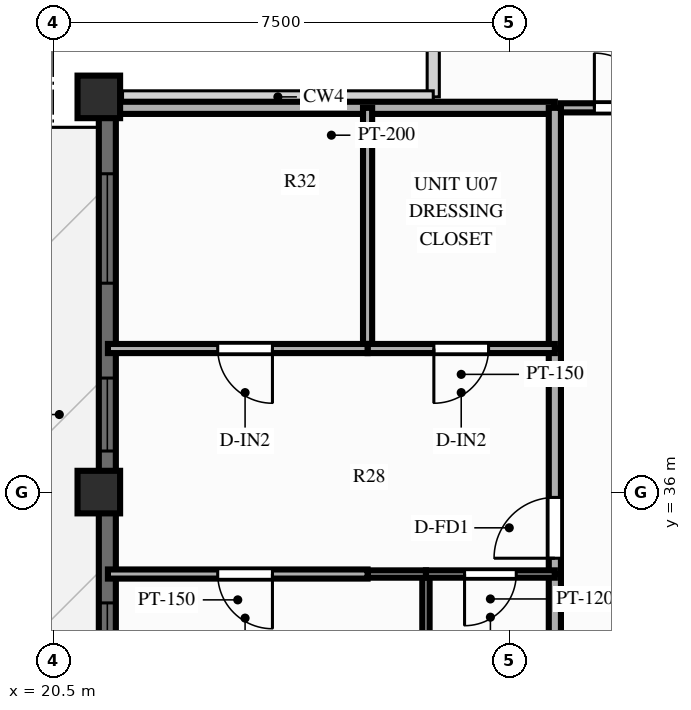
"""IFC4 building model, lengths in metres.
Left out: names, types, materials, properties, quantities, classifications, styles, units other than length and angle.
Written with IfcOpenShell. Run it as: python <this file> out.ifc"""

import sys

from ifc_helpers import new_model, si_unit, direction, frame, frame_2d, origin, origin_2d, place, context, subcontext, project, spatial, rectangle, extrude, source, transform, mapped, element, fill, save


model = new_model("IFC4")
c1 = context("Model", 3, precision=1e-05, world=origin(), true_north=direction((0.0, 1.0)))
c2 = subcontext(c1, "Body", "Model", "MODEL_VIEW")
j1 = project(units=[si_unit("LENGTHUNIT", "METRE"), si_unit("PLANEANGLEUNIT", "RADIAN")], contexts=[c1])
p1 = place(None, origin())
s1 = spatial("IfcSite", under=j1, at=p1, CompositionType="ELEMENT")
p2 = place(p1, origin())
s2 = spatial("IfcBuilding", under=s1, at=p2, CompositionType="ELEMENT")
p3 = place(p2, frame((0.0, 0.0, 226.2)))
s3 = spatial("IfcBuildingStorey", under=s2, at=p3, CompositionType="ELEMENT", Elevation=226.2)
m1 = source(origin(), c2, "Body", "SweptSolid", [
    extrude(rectangle(XDim=0.7, YDim=0.7, at=origin_2d()), origin(), (0.0, 0.0, 1.0), 3.9),
])
for number, where, z_axis, x_axis in (
    (1, (21.25, 42.5, 0.0), (0.0, 0.0, 1.0), (1.0, 0.0, 0.0)),
    (2, (21.25, 36.0, 0.0), (0.0, 0.0, 1.0), (1.0, 0.0, 0.0)),
):
    element("IfcColumn", number, at=place(p3, frame(where, z_axis=z_axis, x_axis=x_axis)), inside=s3, PredefinedType="COLUMN", context=c2, shape_type="MappedRepresentation", body=[
        mapped(m1, transform((0.0, 0.0, 0.0), scale=1.0)),
    ])
p4 = place(p3, frame((21.39, 11.5, 0.0), z_axis=(0.0, 0.0, 1.0), x_axis=(0.0, 1.0, 0.0)))
e3 = element("IfcWall", 3, at=p4, inside=s3, PredefinedType="SOLIDWALL", context=c2, shape_type="SweptSolid", body=[
    extrude(rectangle(XDim=31.0, YDim=0.28, at=frame_2d((15.5, 0.0))), origin(), (0.0, 0.0, 1.0), 2.79),
])
p5 = place(p4, frame((0.66, 0.0, 0.85)))
e4 = element("IfcOpeningElement", 4, at=p5, cuts=e3, PredefinedType="OPENING", context=c2, shape_type="SweptSolid", body=[
    extrude(rectangle(XDim=1.8, YDim=1.65, at=frame_2d((0.9, 0.825))), frame((0.0, 0.152, 0.0), z_axis=(0.0, -1.0, 0.0), x_axis=(1.0, 0.0, 0.0)), (0.0, 0.0, 1.0), 0.304),
])
p6 = place(p4, frame((3.72, 0.0, 0.85)))
e5 = element("IfcOpeningElement", 5, at=p6, cuts=e3, PredefinedType="OPENING", context=c2, shape_type="SweptSolid", body=[
    extrude(rectangle(XDim=1.8, YDim=1.65, at=frame_2d((0.9, 0.825))), frame((0.0, 0.152, 0.0), z_axis=(0.0, -1.0, 0.0), x_axis=(1.0, 0.0, 0.0)), (0.0, 0.0, 1.0), 0.304),
])
p7 = place(p4, frame((7.635, 0.0, 0.85)))
e6 = element("IfcOpeningElement", 6, at=p7, cuts=e3, PredefinedType="OPENING", context=c2, shape_type="SweptSolid", body=[
    extrude(rectangle(XDim=1.8, YDim=1.65, at=frame_2d((0.9, 0.825))), frame((0.0, 0.152, 0.0), z_axis=(0.0, -1.0, 0.0), x_axis=(1.0, 0.0, 0.0)), (0.0, 0.0, 1.0), 0.304),
])
p8 = place(p4, frame((10.766, 0.0, 0.85)))
e7 = element("IfcOpeningElement", 7, at=p8, cuts=e3, PredefinedType="OPENING", context=c2, shape_type="SweptSolid", body=[
    extrude(rectangle(XDim=1.8, YDim=1.65, at=frame_2d((0.9, 0.825))), frame((0.0, 0.152, 0.0), z_axis=(0.0, -1.0, 0.0), x_axis=(1.0, 0.0, 0.0)), (0.0, 0.0, 1.0), 0.304),
])
p9 = place(p4, frame((14.0, 0.0, 0.0)))
e8 = element("IfcOpeningElement", 8, at=p9, cuts=e3, PredefinedType="OPENING", context=c2, shape_type="SweptSolid", body=[
    extrude(rectangle(XDim=1.6, YDim=2.15, at=frame_2d((0.8, 1.075))), frame((0.0, 0.152, 0.0), z_axis=(0.0, -1.0, 0.0), x_axis=(1.0, 0.0, 0.0)), (0.0, 0.0, 1.0), 0.304),
])
p10 = place(p4, frame((17.581, 0.0, 0.85)))
e9 = element("IfcOpeningElement", 9, at=p10, cuts=e3, PredefinedType="OPENING", context=c2, shape_type="SweptSolid", body=[
    extrude(rectangle(XDim=1.8, YDim=1.65, at=frame_2d((0.9, 0.825))), frame((0.0, 0.152, 0.0), z_axis=(0.0, -1.0, 0.0), x_axis=(1.0, 0.0, 0.0)), (0.0, 0.0, 1.0), 0.304),
])
p11 = place(p4, frame((20.877, 0.0, 0.85)))
e10 = element("IfcOpeningElement", 10, at=p11, cuts=e3, PredefinedType="OPENING", context=c2, shape_type="SweptSolid", body=[
    extrude(rectangle(XDim=1.8, YDim=1.65, at=frame_2d((0.9, 0.825))), frame((0.0, 0.152, 0.0), z_axis=(0.0, -1.0, 0.0), x_axis=(1.0, 0.0, 0.0)), (0.0, 0.0, 1.0), 0.304),
])
p12 = place(p4, frame((25.176, 0.0, 0.85)))
e11 = element("IfcOpeningElement", 11, at=p12, cuts=e3, PredefinedType="OPENING", context=c2, shape_type="SweptSolid", body=[
    extrude(rectangle(XDim=1.2, YDim=1.5, at=frame_2d((0.6, 0.75))), frame((0.0, 0.152, 0.0), z_axis=(0.0, -1.0, 0.0), x_axis=(1.0, 0.0, 0.0)), (0.0, 0.0, 1.0), 0.304),
])
p13 = place(p4, frame((27.936, 0.0, 0.85)))
e12 = element("IfcOpeningElement", 12, at=p13, cuts=e3, PredefinedType="OPENING", context=c2, shape_type="SweptSolid", body=[
    extrude(rectangle(XDim=1.8, YDim=1.65, at=frame_2d((0.9, 0.825))), frame((0.0, 0.152, 0.0), z_axis=(0.0, -1.0, 0.0), x_axis=(1.0, 0.0, 0.0)), (0.0, 0.0, 1.0), 0.304),
])
p14 = place(p3, frame((28.85, 42.32, 0.0), z_axis=(0.0, 0.0, 1.0), x_axis=(1.0, 0.0, 0.0)))
e13 = element("IfcWall", 13, at=p14, inside=s3, PredefinedType="PARTITIONING", context=c2, shape_type="SweptSolid", body=[
    extrude(rectangle(XDim=2.33, YDim=0.15, at=frame_2d((1.165, 0.0))), origin(), (0.0, 0.0, 1.0), 3.69),
])
p15 = place(p14, frame((0.55, 0.0, 0.0)))
e14 = element("IfcOpeningElement", 14, at=p15, cuts=e13, PredefinedType="OPENING", context=c2, shape_type="SweptSolid", body=[
    extrude(rectangle(XDim=0.9, YDim=2.1, at=frame_2d((0.45, 1.05))), frame((0.0, 0.087, 0.0), z_axis=(0.0, -1.0, 0.0), x_axis=(1.0, 0.0, 0.0)), (0.0, 0.0, 1.0), 0.174),
])
p16 = place(p3, frame((28.75, 42.32, 0.0), z_axis=(0.0, 0.0, 1.0), x_axis=(-1.0, 0.0, 0.0)))
e15 = element("IfcWall", 15, at=p16, inside=s3, PredefinedType="PARTITIONING", context=c2, shape_type="SweptSolid", body=[
    extrude(rectangle(XDim=7.35, YDim=0.2, at=frame_2d((3.675, 0.0))), origin(), (0.0, 0.0, 1.0), 3.69),
])
p17 = place(p3, frame((28.75, 31.902, 0.0), z_axis=(0.0, 0.0, 1.0), x_axis=(0.0, 1.0, 0.0)))
e16 = element("IfcWall", 16, at=p17, inside=s3, PredefinedType="PARTITIONING", context=c2, shape_type="SweptSolid", body=[
    extrude(rectangle(XDim=2.75, YDim=0.2, at=frame_2d((1.375, 0.0))), origin(), (0.0, 0.0, 1.0), 3.69),
])
p18 = place(p3, frame((28.75, 34.652, 0.0), z_axis=(0.0, 0.0, 1.0), x_axis=(0.0, 1.0, 0.0)))
e17 = element("IfcWall", 17, at=p18, inside=s3, PredefinedType="PARTITIONING", context=c2, shape_type="SweptSolid", body=[
    extrude(rectangle(XDim=3.709, YDim=0.2, at=frame_2d((1.854, 0.0))), origin(), (0.0, 0.0, 1.0), 3.69),
])
p19 = place(p18, frame((0.26, 0.0, 0.0)))
e18 = element("IfcOpeningElement", 18, at=p19, cuts=e17, PredefinedType="OPENING", context=c2, shape_type="SweptSolid", body=[
    extrude(rectangle(XDim=1.0, YDim=2.15, at=frame_2d((0.5, 1.075))), frame((0.0, 0.112, 0.0), z_axis=(0.0, -1.0, 0.0), x_axis=(1.0, 0.0, 0.0)), (0.0, 0.0, 1.0), 0.224),
])
p20 = place(p3, frame((28.75, 38.361, 0.0), z_axis=(0.0, 0.0, 1.0), x_axis=(0.0, 1.0, 0.0)))
e19 = element("IfcWall", 19, at=p20, inside=s3, PredefinedType="PARTITIONING", context=c2, shape_type="SweptSolid", body=[
    extrude(rectangle(XDim=3.959, YDim=0.2, at=frame_2d((1.979, 0.0))), origin(), (0.0, 0.0, 1.0), 3.69),
])
p21 = place(p3, frame((26.63, 31.902, 0.0), z_axis=(0.0, 0.0, 1.0), x_axis=(0.0, 1.0, 0.0)))
e20 = element("IfcWall", 20, at=p21, inside=s3, PredefinedType="PARTITIONING", context=c2, shape_type="SweptSolid", body=[
    extrude(rectangle(XDim=2.75, YDim=0.12, at=frame_2d((1.375, 0.0))), origin(), (0.0, 0.0, 1.0), 3.39),
])
p22 = place(p3, frame((25.67, 38.361, 0.0), z_axis=(0.0, 0.0, 1.0), x_axis=(0.0, 1.0, 0.0)))
e21 = element("IfcWall", 21, at=p22, inside=s3, PredefinedType="PARTITIONING", context=c2, shape_type="SweptSolid", body=[
    extrude(rectangle(XDim=3.959, YDim=0.15, at=frame_2d((1.979, 0.0))), origin(), (0.0, 0.0, 1.0), 3.69),
])
p23 = place(p3, frame((28.75, 34.652, 0.0), z_axis=(0.0, 0.0, 1.0), x_axis=(-1.0, 0.0, 0.0)))
e22 = element("IfcWall", 22, at=p23, inside=s3, PredefinedType="PARTITIONING", context=c2, shape_type="SweptSolid", body=[
    extrude(rectangle(XDim=2.12, YDim=0.12, at=frame_2d((1.06, 0.0))), origin(), (0.0, 0.0, 1.0), 3.69),
])
p24 = place(p23, frame((0.635, 0.0, 0.0)))
e23 = element("IfcOpeningElement", 23, at=p24, cuts=e22, PredefinedType="OPENING", context=c2, shape_type="SweptSolid", body=[
    extrude(rectangle(XDim=0.85, YDim=2.05, at=frame_2d((0.425, 1.025))), frame((0.0, 0.072, 0.0), z_axis=(0.0, -1.0, 0.0), x_axis=(1.0, 0.0, 0.0)), (0.0, 0.0, 1.0), 0.144),
])
p25 = place(p3, frame((26.63, 34.652, 0.0), z_axis=(0.0, 0.0, 1.0), x_axis=(-1.0, 0.0, 0.0)))
e24 = element("IfcWall", 24, at=p25, inside=s3, PredefinedType="PARTITIONING", context=c2, shape_type="SweptSolid", body=[
    extrude(rectangle(XDim=0.96, YDim=0.12, at=frame_2d((0.48, 0.0))), origin(), (0.0, 0.0, 1.0), 3.69),
])
p26 = place(p3, frame((25.67, 34.652, 0.0), z_axis=(0.0, 0.0, 1.0), x_axis=(-1.0, 0.0, 0.0)))
e25 = element("IfcWall", 25, at=p26, inside=s3, PredefinedType="PARTITIONING", context=c2, shape_type="SweptSolid", body=[
    extrude(rectangle(XDim=4.27, YDim=0.15, at=frame_2d((2.135, 0.0))), origin(), (0.0, 0.0, 1.0), 3.69),
])
p27 = place(p26, frame((1.565, 0.0, 0.0)))
e26 = element("IfcOpeningElement", 26, at=p27, cuts=e25, PredefinedType="OPENING", context=c2, shape_type="SweptSolid", body=[
    extrude(rectangle(XDim=0.9, YDim=2.1, at=frame_2d((0.45, 1.05))), frame((0.0, 0.087, 0.0), z_axis=(0.0, -1.0, 0.0), x_axis=(1.0, 0.0, 0.0)), (0.0, 0.0, 1.0), 0.174),
])
p28 = place(p3, frame((28.75, 38.361, 0.0), z_axis=(0.0, 0.0, 1.0), x_axis=(-1.0, 0.0, 0.0)))
e27 = element("IfcWall", 27, at=p28, inside=s3, PredefinedType="PARTITIONING", context=c2, shape_type="SweptSolid", body=[
    extrude(rectangle(XDim=3.08, YDim=0.15, at=frame_2d((1.54, 0.0))), origin(), (0.0, 0.0, 1.0), 3.69),
])
p29 = place(p28, frame((1.09, 0.0, 0.0)))
e28 = element("IfcOpeningElement", 28, at=p29, cuts=e27, PredefinedType="OPENING", context=c2, shape_type="SweptSolid", body=[
    extrude(rectangle(XDim=0.9, YDim=2.1, at=frame_2d((0.45, 1.05))), frame((0.0, 0.087, 0.0), z_axis=(0.0, -1.0, 0.0), x_axis=(1.0, 0.0, 0.0)), (0.0, 0.0, 1.0), 0.174),
])
p30 = place(p3, frame((25.67, 38.361, 0.0), z_axis=(0.0, 0.0, 1.0), x_axis=(-1.0, 0.0, 0.0)))
e29 = element("IfcWall", 29, at=p30, inside=s3, PredefinedType="PARTITIONING", context=c2, shape_type="SweptSolid", body=[
    extrude(rectangle(XDim=4.27, YDim=0.15, at=frame_2d((2.135, 0.0))), origin(), (0.0, 0.0, 1.0), 3.69),
])
p31 = place(p30, frame((1.565, 0.0, 0.0)))
e30 = element("IfcOpeningElement", 30, at=p31, cuts=e29, PredefinedType="OPENING", context=c2, shape_type="SweptSolid", body=[
    extrude(rectangle(XDim=0.9, YDim=2.1, at=frame_2d((0.45, 1.05))), frame((0.0, 0.087, 0.0), z_axis=(0.0, -1.0, 0.0), x_axis=(1.0, 0.0, 0.0)), (0.0, 0.0, 1.0), 0.174),
])
m2 = source(origin(), c2, "Body", "SweptSolid", [
    extrude(rectangle(XDim=1.8, YDim=1.65, at=frame_2d((0.9, 0.825))), frame((0.0, 0.03, 0.0), z_axis=(0.0, -1.0, 0.0), x_axis=(1.0, 0.0, 0.0)), (0.0, 0.0, 1.0), 0.06),
])
p32 = place(p11, origin())
e31 = element("IfcWindow", 31, at=p32, inside=s3, PartitioningType="SINGLE_PANEL", PredefinedType="WINDOW", context=c2, shape_type="MappedRepresentation", body=[
    mapped(m2, transform((0.0, 0.0, 0.0), scale=1.0)),
])
fill(e10, e31)
m3 = source(origin(), c2, "Body", "SweptSolid", [
    extrude(rectangle(XDim=1.2, YDim=1.5, at=frame_2d((0.6, 0.75))), frame((0.0, 0.03, 0.0), z_axis=(0.0, -1.0, 0.0), x_axis=(1.0, 0.0, 0.0)), (0.0, 0.0, 1.0), 0.06),
])
p33 = place(p12, origin())
e32 = element("IfcWindow", 32, at=p33, inside=s3, PartitioningType="SINGLE_PANEL", PredefinedType="WINDOW", context=c2, shape_type="MappedRepresentation", body=[
    mapped(m3, transform((0.0, 0.0, 0.0), scale=1.0)),
])
fill(e11, e32)
p34 = place(p13, origin())
e33 = element("IfcWindow", 33, at=p34, inside=s3, PartitioningType="SINGLE_PANEL", PredefinedType="WINDOW", context=c2, shape_type="MappedRepresentation", body=[
    mapped(m2, transform((0.0, 0.0, 0.0), scale=1.0)),
])
fill(e12, e33)
m4 = source(origin(), c2, "Body", "SweptSolid", [
    extrude(rectangle(XDim=0.9, YDim=2.1, at=frame_2d((0.45, 1.05))), frame((0.0, 0.025, 0.0), z_axis=(0.0, -1.0, 0.0), x_axis=(1.0, 0.0, 0.0)), (0.0, 0.0, 1.0), 0.05),
])
p35 = place(p15, origin())
e34 = element("IfcDoor", 34, at=p35, inside=s3, OperationType="SINGLE_SWING_LEFT", PredefinedType="DOOR", context=c2, shape_type="MappedRepresentation", body=[
    mapped(m4, transform((0.0, 0.0, 0.0), scale=1.0)),
])
fill(e14, e34)
m5 = source(origin(), c2, "Body", "SweptSolid", [
    extrude(rectangle(XDim=1.0, YDim=2.15, at=frame_2d((0.5, 1.075))), frame((0.0, 0.025, 0.0), z_axis=(0.0, -1.0, 0.0), x_axis=(1.0, 0.0, 0.0)), (0.0, 0.0, 1.0), 0.05),
])
p36 = place(p19, origin())
e35 = element("IfcDoor", 35, at=p36, inside=s3, OperationType="SINGLE_SWING_LEFT", PredefinedType="DOOR", context=c2, shape_type="MappedRepresentation", body=[
    mapped(m5, transform((0.0, 0.0, 0.0), scale=1.0)),
])
fill(e18, e35)
m6 = source(origin(), c2, "Body", "SweptSolid", [
    extrude(rectangle(XDim=0.85, YDim=2.05, at=frame_2d((0.425, 1.025))), frame((0.0, 0.025, 0.0), z_axis=(0.0, -1.0, 0.0), x_axis=(1.0, 0.0, 0.0)), (0.0, 0.0, 1.0), 0.05),
])
p37 = place(p24, origin())
e36 = element("IfcDoor", 36, at=p37, inside=s3, OperationType="SINGLE_SWING_RIGHT", PredefinedType="DOOR", context=c2, shape_type="MappedRepresentation", body=[
    mapped(m6, transform((0.0, 0.0, 0.0), scale=1.0)),
])
fill(e23, e36)
p38 = place(p27, origin())
e37 = element("IfcDoor", 37, at=p38, inside=s3, OperationType="SINGLE_SWING_LEFT", PredefinedType="DOOR", context=c2, shape_type="MappedRepresentation", body=[
    mapped(m4, transform((0.0, 0.0, 0.0), scale=1.0)),
])
fill(e26, e37)
p39 = place(p29, origin())
e38 = element("IfcDoor", 38, at=p39, inside=s3, OperationType="SINGLE_SWING_RIGHT", PredefinedType="DOOR", context=c2, shape_type="MappedRepresentation", body=[
    mapped(m4, transform((0.0, 0.0, 0.0), scale=1.0)),
])
fill(e28, e38)
p40 = place(p31, origin())
e39 = element("IfcDoor", 39, at=p40, inside=s3, OperationType="SINGLE_SWING_LEFT", PredefinedType="DOOR", context=c2, shape_type="MappedRepresentation", body=[
    mapped(m4, transform((0.0, 0.0, 0.0), scale=1.0)),
])
fill(e30, e39)
save(model, sys.argv[1])
